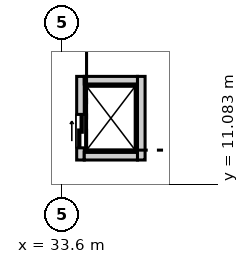
"""IFC4 building model, lengths in metres.
Left out: names, types, materials, properties, quantities, classifications, styles, units other than length and angle.
Written with IfcOpenShell. Run it as: python <this file> out.ifc"""

import sys

from ifc_helpers import new_model, si_unit, direction, frame, frame_2d, origin, place, context, subcontext, project, spatial, rectangle, extrude, element, fill, save


model = new_model("IFC4")
c1 = context("Model", 3, precision=1e-05, world=origin(), true_north=direction((0.0, 1.0)))
c2 = subcontext(c1, "Body", "Model", "MODEL_VIEW")
j1 = project(units=[si_unit("LENGTHUNIT", "METRE"), si_unit("PLANEANGLEUNIT", "RADIAN")], contexts=[c1])
p1 = place(None, origin())
s1 = spatial("IfcSite", under=j1, at=p1, CompositionType="ELEMENT")
p2 = place(p1, origin())
s2 = spatial("IfcBuilding", under=s1, at=p2, CompositionType="ELEMENT")
p3 = place(p2, origin())
s3 = spatial("IfcBuildingStorey", under=s2, at=p3, CompositionType="ELEMENT", Elevation=0.0)
p4 = place(p3, frame((34.2, 11.875, 0.0), z_axis=(0.0, 0.0, 1.0), x_axis=(0.0, 1.0, 0.0)))
e1 = element("IfcWall", 1, at=p4, inside=s3, PredefinedType="SOLIDWALL", context=c2, shape_type="SweptSolid", body=[
    extrude(rectangle(XDim=2.75, YDim=0.25, at=frame_2d((1.375, 0.0))), origin(), (0.0, 0.0, 1.0), 5.65),
])
p5 = place(p4, frame((0.4, 0.0, 0.0)))
e2 = element("IfcOpeningElement", 2, at=p5, cuts=e1, PredefinedType="OPENING", context=c2, shape_type="SweptSolid", body=[
    extrude(rectangle(XDim=1.1, YDim=2.15, at=frame_2d((0.55, 1.075))), frame((0.0, 0.135, 0.0), z_axis=(0.0, -1.0, 0.0), x_axis=(1.0, 0.0, 0.0)), (0.0, 0.0, 1.0), 0.27),
])
p6 = place(p3, frame((36.2, 11.875, 0.0), z_axis=(0.0, 0.0, 1.0), x_axis=(0.0, 1.0, 0.0)))
e3 = element("IfcWall", 3, at=p6, inside=s3, PredefinedType="SOLIDWALL", context=c2, shape_type="SweptSolid", body=[
    extrude(rectangle(XDim=2.75, YDim=0.25, at=frame_2d((1.375, 0.0))), origin(), (0.0, 0.0, 1.0), 5.65),
])
for number, where, z_axis, x_axis in (
    (4, (34.325, 12.0, 0.0), (0.0, 0.0, 1.0), (1.0, 0.0, 0.0)),
    (5, (34.325, 14.5, 0.0), (0.0, 0.0, 1.0), (1.0, 0.0, 0.0)),
):
    element("IfcWall", number, at=place(p3, frame(where, z_axis=z_axis, x_axis=x_axis)), inside=s3, PredefinedType="SOLIDWALL", context=c2, shape_type="SweptSolid", body=[
        extrude(rectangle(XDim=1.75, YDim=0.25, at=frame_2d((0.875, 0.0))), origin(), (0.0, 0.0, 1.0), 5.65),
    ])
p7 = place(p5, origin())
e6 = element("IfcDoor", 6, at=p7, inside=s3, OperationType="SLIDING_TO_LEFT", PredefinedType="DOOR", context=c2, shape_type="SweptSolid", body=[
    extrude(rectangle(XDim=1.1, YDim=2.15, at=frame_2d((0.55, 1.075))), frame((0.0, 0.025, 0.0), z_axis=(0.0, -1.0, 0.0), x_axis=(1.0, 0.0, 0.0)), (0.0, 0.0, 1.0), 0.05),
])
fill(e2, e6)
save(model, sys.argv[1])
